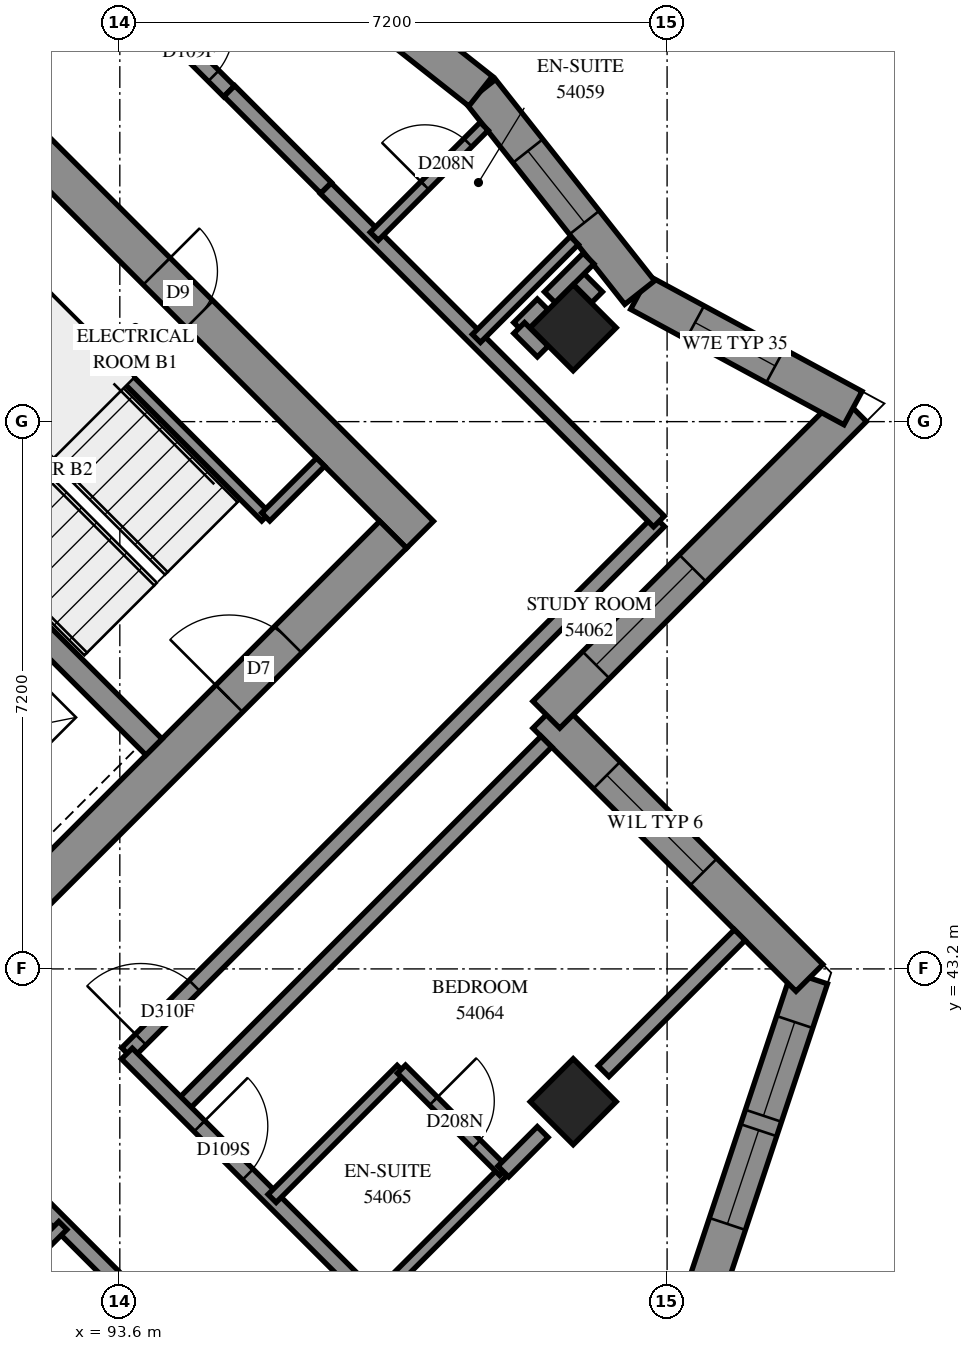
"""IFC4 building model, lengths in metres.
Left out: names, types, materials, properties, quantities, classifications, styles, units other than length and angle.
Written with IfcOpenShell. Run it as: python <this file> out.ifc"""

import sys

from ifc_helpers import new_model, si_unit, direction, frame, frame_2d, origin, origin_2d, place, context, subcontext, project, spatial, polyline, rectangle, outline, extrude, element, fill, save


model = new_model("IFC4")
c1 = context("Model", 3, precision=1e-05, world=origin(), true_north=direction((0.0, 1.0)))
c2 = subcontext(c1, "Body", "Model", "MODEL_VIEW")
j1 = project(units=[si_unit("LENGTHUNIT", "METRE"), si_unit("PLANEANGLEUNIT", "RADIAN")], contexts=[c1])
p1 = place(None, origin())
s1 = spatial("IfcSite", under=j1, at=p1, CompositionType="ELEMENT")
p2 = place(p1, origin())
s2 = spatial("IfcBuilding", under=s1, at=p2, CompositionType="ELEMENT")
p3 = place(p2, frame((0.0, 0.0, 199.8)))
s3 = spatial("IfcBuildingStorey", under=s2, at=p3, CompositionType="ELEMENT", Elevation=199.8)
for number, where, z_axis, x_axis in (
    (1, (99.565, 51.635, 0.0), (0.0, 0.0, 1.0), (0.707, -0.707, 0.0)),
    (2, (99.565, 41.453, 0.0), (0.0, 0.0, 1.0), (0.707, -0.707, 0.0)),
):
    element("IfcColumn", number, at=place(p3, frame(where, z_axis=z_axis, x_axis=x_axis)), inside=s3, PredefinedType="COLUMN", context=c2, shape_type="SweptSolid", body=[
        extrude(rectangle(XDim=0.8, YDim=0.8, at=origin_2d()), origin(), (0.0, 0.0, 1.0), 3.1),
    ])
p4 = place(p3, frame((86.66, 59.802, -0.3), z_axis=(0.0, 0.0, 1.0), x_axis=(0.7071067812, -0.7071067812, 0.0)))
e3 = element("IfcWall", 3, at=p4, inside=s3, PredefinedType="SHEAR", context=c2, shape_type="SweptSolid", body=[
    extrude(rectangle(XDim=15.4, YDim=0.5, at=frame_2d((7.7, 0.0))), origin(), (0.0, 0.0, 1.0), 2.7),
])
p5 = place(p4, frame((10.5, 0.0, 0.3)))
e4 = element("IfcOpeningElement", 4, at=p5, cuts=e3, PredefinedType="OPENING", context=c2, shape_type="SweptSolid", body=[
    extrude(rectangle(XDim=0.8, YDim=2.1, at=frame_2d((0.4, 1.05))), frame((0.0, 0.26, 0.0), z_axis=(0.0, -1.0, 0.0), x_axis=(1.0, 0.0, 0.0)), (0.0, 0.0, 1.0), 0.52),
])
p6 = place(p3, frame((87.013, 38.731, -0.3), z_axis=(0.0, 0.0, 1.0), x_axis=(0.7071067812, 0.7071067812, 0.0)))
e5 = element("IfcWall", 5, at=p6, inside=s3, PredefinedType="SHEAR", context=c2, shape_type="SweptSolid", body=[
    extrude(rectangle(XDim=14.4, YDim=0.5, at=frame_2d((7.2, 0.0))), origin(), (0.0, 0.0, 1.0), 2.7),
])
p7 = place(p6, frame((4.55, 0.0, 0.3)))
e6 = element("IfcOpeningElement", 6, at=p7, cuts=e5, PredefinedType="OPENING", context=c2, shape_type="SweptSolid", body=[
    extrude(rectangle(XDim=1.1, YDim=2.1, at=frame_2d((0.55, 1.05))), frame((0.0, 0.26, 0.0), z_axis=(0.0, -1.0, 0.0), x_axis=(1.0, 0.0, 0.0)), (0.0, 0.0, 1.0), 0.52),
])
p8 = place(p6, frame((11.35, 0.0, 0.3)))
e7 = element("IfcOpeningElement", 7, at=p8, cuts=e5, PredefinedType="OPENING", context=c2, shape_type="SweptSolid", body=[
    extrude(rectangle(XDim=1.1, YDim=2.1, at=frame_2d((0.55, 1.05))), frame((0.0, 0.26, 0.0), z_axis=(0.0, -1.0, 0.0), x_axis=(1.0, 0.0, 0.0)), (0.0, 0.0, 1.0), 0.52),
])
p9 = place(p3, frame((88.958, 51.211, 0.0), z_axis=(0.0, 0.0, 1.0), x_axis=(0.7070998367, -0.7071137256, 0.0)))
e8 = element("IfcWall", 8, at=p9, inside=s3, PredefinedType="SOLIDWALL", context=c2, shape_type="SweptSolid", body=[
    extrude(rectangle(XDim=7.2, YDim=0.3, at=frame_2d((3.6, 0.0))), origin(), (0.0, 0.0, 1.0), 3.1),
])
p10 = place(p3, frame((101.062, 38.252, 0.0), z_axis=(0.0, 0.0, 1.0), x_axis=(0.3162395484, 0.9486793705, 0.0)))
e9 = element("IfcWall", 9, at=p10, inside=s3, PredefinedType="SOLIDWALL", context=c2, shape_type="SweptSolid", body=[
    extrude(outline(polyline([(-0.12, -0.25), (5.247, -0.25), (4.938, 0.25), (0.12, 0.25), (-0.12, -0.25)])), origin(), (0.0, 0.0, 1.0), 3.1),
])
p11 = place(p10, frame((1.68, 0.0, 0.45)))
e10 = element("IfcOpeningElement", 10, at=p11, cuts=e9, PredefinedType="OPENING", context=c2, shape_type="SweptSolid", body=[
    extrude(rectangle(XDim=1.3, YDim=2.5, at=frame_2d((0.65, 1.25))), frame((0.0, 0.26, 0.0), z_axis=(0.0, -1.0, 0.0), x_axis=(1.0, 0.0, 0.0)), (0.0, 0.0, 1.0), 0.52),
])
p12 = place(p10, frame((3.18, 0.0, 0.45)))
e11 = element("IfcOpeningElement", 11, at=p12, cuts=e9, PredefinedType="OPENING", context=c2, shape_type="SweptSolid", body=[
    extrude(rectangle(XDim=1.3, YDim=2.5, at=frame_2d((0.65, 1.25))), frame((0.0, 0.26, 0.0), z_axis=(0.0, -1.0, 0.0), x_axis=(1.0, 0.0, 0.0)), (0.0, 0.0, 1.0), 0.52),
])
p13 = place(p3, frame((102.673, 43.083, 0.0), z_axis=(0.0, 0.0, 1.0), x_axis=(-0.7071067812, 0.7071067812, 0.0)))
e12 = element("IfcWall", 12, at=p13, inside=s3, PredefinedType="SOLIDWALL", context=c2, shape_type="SweptSolid", body=[
    extrude(outline(polyline([(-0.154, -0.25), (4.646, -0.25), (5.146, 0.25), (0.154, 0.25), (-0.154, -0.25)])), origin(), (0.0, 0.0, 1.0), 3.1),
])
p14 = place(p13, frame((1.97, 0.0, 0.6)))
e13 = element("IfcOpeningElement", 13, at=p14, cuts=e12, PredefinedType="OPENING", context=c2, shape_type="SweptSolid", body=[
    extrude(rectangle(XDim=1.8, YDim=1.9, at=frame_2d((0.9, 0.95))), frame((0.0, 0.26, 0.0), z_axis=(0.0, -1.0, 0.0), x_axis=(1.0, 0.0, 0.0)), (0.0, 0.0, 1.0), 0.52),
])
p15 = place(p3, frame((99.211, 46.544, 0.0), z_axis=(0.0, 0.0, 1.0), x_axis=(0.7071067812, 0.7071067812, 0.0)))
e14 = element("IfcWall", 14, at=p15, inside=s3, PredefinedType="SOLIDWALL", context=c2, shape_type="SweptSolid", body=[
    extrude(outline(polyline([(0.25, -0.25), (6.041, -0.25), (5.371, 0.25), (-0.25, 0.25), (0.25, -0.25)])), origin(), (0.0, 0.0, 1.0), 3.1),
])
p16 = place(p15, frame((0.925, 0.0, 0.6)))
e15 = element("IfcOpeningElement", 15, at=p16, cuts=e14, PredefinedType="OPENING", context=c2, shape_type="SweptSolid", body=[
    extrude(rectangle(XDim=1.8, YDim=1.9, at=frame_2d((0.9, 0.95))), frame((0.0, 0.26, 0.0), z_axis=(0.0, -1.0, 0.0), x_axis=(1.0, 0.0, 0.0)), (0.0, 0.0, 1.0), 0.52),
])
p17 = place(p3, frame((103.246, 50.579, 0.0), z_axis=(0.0, 0.0, 1.0), x_axis=(-0.8794013024, 0.4760812424, 0.0)))
e16 = element("IfcWall", 16, at=p17, inside=s3, PredefinedType="SOLIDWALL", context=c2, shape_type="SweptSolid", body=[
    extrude(outline(polyline([(-0.335, -0.25), (3.14, -0.25), (3.243, 0.25), (0.335, 0.25), (-0.335, -0.25)])), origin(), (0.0, 0.0, 1.0), 3.1),
])
p18 = place(p17, frame((1.163, 0.0, 0.45)))
e17 = element("IfcOpeningElement", 17, at=p18, cuts=e16, PredefinedType="OPENING", context=c2, shape_type="SweptSolid", body=[
    extrude(rectangle(XDim=1.2, YDim=2.5, at=frame_2d((0.6, 1.25))), frame((0.0, 0.26, 0.0), z_axis=(0.0, -1.0, 0.0), x_axis=(1.0, 0.0, 0.0)), (0.0, 0.0, 1.0), 0.52),
])
p19 = place(p3, frame((100.439, 52.098, 0.0), z_axis=(0.0, 0.0, 1.0), x_axis=(-0.6198277208, 0.7847379158, 0.0)))
e18 = element("IfcWall", 18, at=p19, inside=s3, PredefinedType="SOLIDWALL", context=c2, shape_type="SweptSolid", body=[
    extrude(outline(polyline([(0.051, -0.25), (3.405, -0.25), (3.346, 0.25), (-0.051, 0.25), (0.051, -0.25)])), origin(), (0.0, 0.0, 1.0), 3.1),
])
p20 = place(p19, frame((1.173, 0.0, 0.45)))
e19 = element("IfcOpeningElement", 19, at=p20, cuts=e18, PredefinedType="OPENING", context=c2, shape_type="SweptSolid", body=[
    extrude(rectangle(XDim=1.2, YDim=2.5, at=frame_2d((0.6, 1.25))), frame((0.0, 0.26, 0.0), z_axis=(0.0, -1.0, 0.0), x_axis=(1.0, 0.0, 0.0)), (0.0, 0.0, 1.0), 0.52),
])
p21 = place(p3, frame((98.347, 54.747, 0.0), z_axis=(0.0, 0.0, 1.0), x_axis=(-0.7847316147, 0.6198356984, 0.0)))
e20 = element("IfcWall", 20, at=p21, inside=s3, PredefinedType="SOLIDWALL", context=c2, shape_type="SweptSolid", body=[
    extrude(outline(polyline([(-0.029, -0.25), (3.324, -0.25), (3.383, 0.25), (0.029, 0.25), (-0.029, -0.25)])), origin(), (0.0, 0.0, 1.0), 3.1),
])
p22 = place(p21, frame((1.248, 0.0, 0.45)))
e21 = element("IfcOpeningElement", 21, at=p22, cuts=e20, PredefinedType="OPENING", context=c2, shape_type="SweptSolid", body=[
    extrude(rectangle(XDim=1.2, YDim=2.5, at=frame_2d((0.6, 1.25))), frame((0.0, 0.26, 0.0), z_axis=(0.0, -1.0, 0.0), x_axis=(1.0, 0.0, 0.0)), (0.0, 0.0, 1.0), 0.52),
])
p23 = place(p3, frame((91.313, 53.354, 0.0), z_axis=(0.0, 0.0, 1.0), x_axis=(0.7071067812, -0.7071067812, 0.0)))
e22 = element("IfcWall", 22, at=p23, inside=s3, PredefinedType="PARTITIONING", context=c2, shape_type="SweptSolid", body=[
    extrude(rectangle(XDim=5.95, YDim=0.15, at=frame_2d((2.975, 0.0))), origin(), (0.0, 0.0, 1.0), 3.1),
])
p24 = place(p3, frame((95.52, 49.146, 0.0), z_axis=(0.0, 0.0, 1.0), x_axis=(0.7071067812, 0.7071067812, 0.0)))
e23 = element("IfcWall", 23, at=p24, inside=s3, PredefinedType="PARTITIONING", context=c2, shape_type="SweptSolid", body=[
    extrude(rectangle(XDim=1.02, YDim=0.15, at=frame_2d((0.51, 0.0))), origin(), (0.0, 0.0, 1.0), 3.1),
])
p25 = place(p3, frame((93.695, 42.091, 0.0), z_axis=(0.0, 0.0, 1.0), x_axis=(0.7071067812, 0.7071067812, 0.0)))
e24 = element("IfcWall", 24, at=p25, inside=s3, PredefinedType="PARTITIONING", context=c2, shape_type="SweptSolid", body=[
    extrude(rectangle(XDim=9.899, YDim=0.2, at=frame_2d((4.95, 0.0))), origin(), (0.0, 0.0, 1.0), 3.1),
])
p26 = place(p25, frame((0.255, 0.0, 0.0)))
e25 = element("IfcOpeningElement", 25, at=p26, cuts=e24, PredefinedType="OPENING", context=c2, shape_type="SweptSolid", body=[
    extrude(rectangle(XDim=1.0, YDim=2.1, at=frame_2d((0.5, 1.05))), frame((0.0, 0.11, 0.0), z_axis=(0.0, -1.0, 0.0), x_axis=(1.0, 0.0, 0.0)), (0.0, 0.0, 1.0), 0.22),
])
p27 = place(p3, frame((94.402, 41.382, 0.0), z_axis=(0.0, 0.0, 1.0), x_axis=(0.7072538072, 0.7069597246, 0.0)))
e26 = element("IfcWall", 26, at=p27, inside=s3, PredefinedType="PARTITIONING", context=c2, shape_type="SweptSolid", body=[
    extrude(rectangle(XDim=6.801, YDim=0.2, at=frame_2d((3.4, 0.0))), origin(), (0.0, 0.0, 1.0), 3.1),
])
p28 = place(p3, frame((96.309, 53.471, 0.0), z_axis=(0.0, 0.0, 1.0), x_axis=(0.7071067812, -0.7071067812, 0.0)))
e27 = element("IfcWall", 27, at=p28, inside=s3, PredefinedType="PARTITIONING", context=c2, shape_type="SweptSolid", body=[
    extrude(rectangle(XDim=6.2, YDim=0.2, at=frame_2d((3.1, 0.0))), origin(), (0.0, 0.0, 1.0), 3.1),
])
p29 = place(p3, frame((93.693, 42.085, 0.0), z_axis=(0.0, 0.0, 1.0), x_axis=(0.7071067812, -0.7071067812, 0.0)))
e28 = element("IfcWall", 28, at=p29, inside=s3, PredefinedType="PARTITIONING", context=c2, shape_type="SweptSolid", body=[
    extrude(rectangle(XDim=4.599, YDim=0.2, at=frame_2d((2.3, 0.0))), origin(), (0.0, 0.0, 1.0), 3.1),
])
p30 = place(p29, frame((1.349, 0.0, 0.0)))
e29 = element("IfcOpeningElement", 29, at=p30, cuts=e28, PredefinedType="OPENING", context=c2, shape_type="SweptSolid", body=[
    extrude(rectangle(XDim=0.9, YDim=2.1, at=frame_2d((0.45, 1.05))), frame((0.0, 0.11, 0.0), z_axis=(0.0, -1.0, 0.0), x_axis=(1.0, 0.0, 0.0)), (0.0, 0.0, 1.0), 0.22),
])
p31 = place(p3, frame((92.137, 40.531, 0.0), z_axis=(0.0, 0.0, 1.0), x_axis=(0.7071067812, -0.7071067812, 0.0)))
e30 = element("IfcWall", 30, at=p31, inside=s3, PredefinedType="PARTITIONING", context=c2, shape_type="SweptSolid", body=[
    extrude(rectangle(XDim=4.599, YDim=0.2, at=frame_2d((2.3, 0.0))), origin(), (0.0, 0.0, 1.0), 3.1),
])
p32 = place(p31, frame((3.083, 0.0, 0.0)))
e31 = element("IfcOpeningElement", 31, at=p32, cuts=e30, PredefinedType="OPENING", context=c2, shape_type="SweptSolid", body=[
    extrude(rectangle(XDim=0.9, YDim=2.1, at=frame_2d((0.45, 1.05))), frame((0.0, 0.11, 0.0), z_axis=(0.0, -1.0, 0.0), x_axis=(1.0, 0.0, 0.0)), (0.0, 0.0, 1.0), 0.22),
])
p33 = place(p3, frame((99.964, 41.854, 0.0), z_axis=(0.0, 0.0, 1.0), x_axis=(0.7071265121, 0.7070870497, 0.0)))
e32 = element("IfcWall", 32, at=p33, inside=s3, PredefinedType="PARTITIONING", context=c2, shape_type="SweptSolid", body=[
    extrude(rectangle(XDim=2.534, YDim=0.2, at=frame_2d((1.267, 0.0))), origin(), (0.0, 0.0, 1.0), 3.1),
])
p34 = place(p3, frame((95.603, 40.181, 0.0), z_axis=(0.0, 0.0, 1.0), x_axis=(0.7071067812, 0.7071067812, 0.0)))
e33 = element("IfcWall", 33, at=p34, inside=s3, PredefinedType="PARTITIONING", context=c2, shape_type="SweptSolid", body=[
    extrude(rectangle(XDim=2.401, YDim=0.15, at=frame_2d((1.201, 0.0))), origin(), (0.0, 0.0, 1.0), 3.1),
])
p35 = place(p3, frame((96.947, 38.837, 0.0), z_axis=(0.0, 0.0, 1.0), x_axis=(0.7071067812, 0.7071067812, 0.0)))
e34 = element("IfcWall", 34, at=p35, inside=s3, PredefinedType="PARTITIONING", context=c2, shape_type="SweptSolid", body=[
    extrude(rectangle(XDim=2.401, YDim=0.15, at=frame_2d((1.201, 0.0))), origin(), (0.0, 0.0, 1.0), 2.6),
])
p36 = place(p3, frame((91.152, 38.128, 0.0), z_axis=(0.0, 0.0, 1.0), x_axis=(0.7075233388, 0.706689978, 0.0)))
e35 = element("IfcWall", 35, at=p36, inside=s3, PredefinedType="PARTITIONING", context=c2, shape_type="SweptSolid", body=[
    extrude(rectangle(XDim=2.4, YDim=0.15, at=frame_2d((1.2, 0.0))), origin(), (0.0, 0.0, 1.0), 3.1),
])
p37 = place(p3, frame((96.948, 52.838, 0.0), z_axis=(0.0, 0.0, 1.0), x_axis=(0.7070823329, 0.7071312287, 0.0)))
e36 = element("IfcWall", 36, at=p37, inside=s3, PredefinedType="PARTITIONING", context=c2, shape_type="SweptSolid", body=[
    extrude(rectangle(XDim=2.045, YDim=0.15, at=frame_2d((1.023, 0.0))), origin(), (0.0, 0.0, 1.0), 3.1),
])
p38 = place(p37, frame((0.943, 0.0, 0.0)))
e37 = element("IfcOpeningElement", 37, at=p38, cuts=e36, PredefinedType="OPENING", context=c2, shape_type="SweptSolid", body=[
    extrude(rectangle(XDim=0.8, YDim=2.1, at=frame_2d((0.4, 1.05))), frame((0.0, 0.085, 0.0), z_axis=(0.0, -1.0, 0.0), x_axis=(1.0, 0.0, 0.0)), (0.0, 0.0, 1.0), 0.17),
])
p39 = place(p3, frame((97.305, 41.881, 0.0), z_axis=(0.0, 0.0, 1.0), x_axis=(0.7071067812, -0.7071067812, 0.0)))
e38 = element("IfcWall", 38, at=p39, inside=s3, PredefinedType="PARTITIONING", context=c2, shape_type="SweptSolid", body=[
    extrude(rectangle(XDim=1.901, YDim=0.15, at=frame_2d((0.95, 0.0))), origin(), (0.0, 0.0, 1.0), 3.1),
])
p40 = place(p39, frame((0.596, 0.0, 0.0)))
e39 = element("IfcOpeningElement", 39, at=p40, cuts=e38, PredefinedType="OPENING", context=c2, shape_type="SweptSolid", body=[
    extrude(rectangle(XDim=0.8, YDim=2.1, at=frame_2d((0.4, 1.05))), frame((0.0, 0.085, 0.0), z_axis=(0.0, -1.0, 0.0), x_axis=(1.0, 0.0, 0.0)), (0.0, 0.0, 1.0), 0.17),
])
p41 = place(p3, frame((93.763, 56.017, 0.0), z_axis=(0.0, 0.0, 1.0), x_axis=(0.7076620277, -0.7065510983, 0.0)))
e40 = element("IfcWall", 40, at=p41, inside=s3, PredefinedType="PARTITIONING", context=c2, shape_type="SweptSolid", body=[
    extrude(rectangle(XDim=1.8, YDim=0.2, at=frame_2d((0.9, 0.0))), origin(), (0.0, 0.0, 1.0), 3.1),
])
p42 = place(p41, frame((0.612, 0.0, 0.0)))
e41 = element("IfcOpeningElement", 41, at=p42, cuts=e40, PredefinedType="OPENING", context=c2, shape_type="SweptSolid", body=[
    extrude(rectangle(XDim=0.9, YDim=2.1, at=frame_2d((0.45, 1.05))), frame((0.0, 0.11, 0.0), z_axis=(0.0, -1.0, 0.0), x_axis=(1.0, 0.0, 0.0)), (0.0, 0.0, 1.0), 0.22),
])
p43 = place(p3, frame((95.041, 54.749, 0.0), z_axis=(0.0, 0.0, 1.0), x_axis=(0.7065510983, -0.7076620277, 0.0)))
e42 = element("IfcWall", 42, at=p43, inside=s3, PredefinedType="PARTITIONING", context=c2, shape_type="SweptSolid", body=[
    extrude(rectangle(XDim=1.8, YDim=0.2, at=frame_2d((0.9, 0.0))), origin(), (0.0, 0.0, 1.0), 3.1),
])
p44 = place(p3, frame((98.291, 51.495, 0.0), z_axis=(0.0, 0.0, 1.0), x_axis=(0.7070793404, 0.7071342209, 0.0)))
e43 = element("IfcWall", 43, at=p44, inside=s3, PredefinedType="PARTITIONING", context=c2, shape_type="SweptSolid", body=[
    extrude(rectangle(XDim=1.822, YDim=0.15, at=frame_2d((0.911, 0.0))), origin(), (0.0, 0.0, 1.0), 3.1),
])
p45 = place(p3, frame((98.645, 40.535, 0.0), z_axis=(0.0, 0.0, 1.0), x_axis=(0.7057430303, 0.7084679069, 0.0)))
e44 = element("IfcWall", 44, at=p45, inside=s3, PredefinedType="PARTITIONING", context=c2, shape_type="SweptSolid", body=[
    extrude(rectangle(XDim=0.734, YDim=0.2, at=frame_2d((0.367, 0.0))), origin(), (0.0, 0.0, 1.0), 2.6),
])
for number, where, z_axis, x_axis in (
    (45, (98.853, 51.633, 0.0), (0.0, 0.0, 1.0), (0.707, 0.707, 0.0)),
    (46, (98.854, 51.632, 0.0), (0.0, 0.0, 1.0), (0.707, -0.707, 0.0)),
    (47, (99.568, 52.346, 0.0), (0.0, 0.0, 1.0), (0.707, -0.707, 0.0)),
):
    element("IfcWall", number, at=place(p3, frame(where, z_axis=z_axis, x_axis=x_axis)), inside=s3, PredefinedType="PARTITIONING", context=c2, shape_type="SweptSolid", body=[
        extrude(rectangle(XDim=0.438, YDim=0.2, at=frame_2d((0.219, 0.0))), origin(), (0.0, 0.0, 1.0), 3.1),
    ])
p46 = place(p3, frame((99.257, 52.037, 0.0), z_axis=(0.0, 0.0, 1.0), x_axis=(0.7071067812, 0.7071067812, 0.0)))
e48 = element("IfcWall", 48, at=p46, inside=s3, PredefinedType="PARTITIONING", context=c2, shape_type="SweptSolid", body=[
    extrude(rectangle(XDim=0.721, YDim=0.2, at=frame_2d((0.36, 0.0))), origin(), (0.0, 0.0, 1.0), 3.1),
])
p47 = place(p11, origin())
e49 = element("IfcWindow", 49, at=p47, inside=s3, PartitioningType="SINGLE_PANEL", PredefinedType="WINDOW", context=c2, shape_type="SweptSolid", body=[
    extrude(rectangle(XDim=1.3, YDim=2.5, at=frame_2d((0.65, 1.25))), frame((0.0, 0.18, 0.0), z_axis=(0.0, -1.0, 0.0), x_axis=(1.0, 0.0, 0.0)), (0.0, 0.0, 1.0), 0.06),
])
fill(e10, e49)
p48 = place(p12, origin())
e50 = element("IfcWindow", 50, at=p48, inside=s3, PartitioningType="SINGLE_PANEL", PredefinedType="WINDOW", context=c2, shape_type="SweptSolid", body=[
    extrude(rectangle(XDim=1.3, YDim=2.5, at=frame_2d((0.65, 1.25))), frame((0.0, 0.18, 0.0), z_axis=(0.0, -1.0, 0.0), x_axis=(1.0, 0.0, 0.0)), (0.0, 0.0, 1.0), 0.06),
])
fill(e11, e50)
p49 = place(p14, origin())
e51 = element("IfcWindow", 51, at=p49, inside=s3, PartitioningType="SINGLE_PANEL", PredefinedType="WINDOW", context=c2, shape_type="SweptSolid", body=[
    extrude(rectangle(XDim=1.8, YDim=1.9, at=frame_2d((0.9, 0.95))), frame((0.0, 0.18, 0.0), z_axis=(0.0, -1.0, 0.0), x_axis=(1.0, 0.0, 0.0)), (0.0, 0.0, 1.0), 0.06),
])
fill(e13, e51)
p50 = place(p16, origin())
e52 = element("IfcWindow", 52, at=p50, inside=s3, PartitioningType="SINGLE_PANEL", PredefinedType="WINDOW", context=c2, shape_type="SweptSolid", body=[
    extrude(rectangle(XDim=1.8, YDim=1.9, at=frame_2d((0.9, 0.95))), frame((0.0, 0.18, 0.0), z_axis=(0.0, -1.0, 0.0), x_axis=(1.0, 0.0, 0.0)), (0.0, 0.0, 1.0), 0.06),
])
fill(e15, e52)
p51 = place(p18, origin())
e53 = element("IfcWindow", 53, at=p51, inside=s3, PartitioningType="SINGLE_PANEL", PredefinedType="WINDOW", context=c2, shape_type="SweptSolid", body=[
    extrude(rectangle(XDim=1.2, YDim=2.5, at=frame_2d((0.6, 1.25))), frame((0.0, 0.18, 0.0), z_axis=(0.0, -1.0, 0.0), x_axis=(1.0, 0.0, 0.0)), (0.0, 0.0, 1.0), 0.06),
])
fill(e17, e53)
p52 = place(p20, origin())
e54 = element("IfcWindow", 54, at=p52, inside=s3, PartitioningType="SINGLE_PANEL", PredefinedType="WINDOW", context=c2, shape_type="SweptSolid", body=[
    extrude(rectangle(XDim=1.2, YDim=2.5, at=frame_2d((0.6, 1.25))), frame((0.0, 0.18, 0.0), z_axis=(0.0, -1.0, 0.0), x_axis=(1.0, 0.0, 0.0)), (0.0, 0.0, 1.0), 0.06),
])
fill(e19, e54)
p53 = place(p5, origin())
e55 = element("IfcDoor", 55, at=p53, inside=s3, OperationType="SINGLE_SWING_RIGHT", PredefinedType="DOOR", context=c2, shape_type="SweptSolid", body=[
    extrude(rectangle(XDim=0.8, YDim=2.1, at=frame_2d((0.4, 1.05))), frame((0.0, 0.025, 0.0), z_axis=(0.0, -1.0, 0.0), x_axis=(1.0, 0.0, 0.0)), (0.0, 0.0, 1.0), 0.05),
])
fill(e4, e55)
p54 = place(p8, origin())
e56 = element("IfcDoor", 56, at=p54, inside=s3, OperationType="SINGLE_SWING_RIGHT", PredefinedType="DOOR", context=c2, shape_type="SweptSolid", body=[
    extrude(rectangle(XDim=1.1, YDim=2.1, at=frame_2d((0.55, 1.05))), frame((0.0, 0.025, 0.0), z_axis=(0.0, -1.0, 0.0), x_axis=(1.0, 0.0, 0.0)), (0.0, 0.0, 1.0), 0.05),
])
fill(e7, e56)
p55 = place(p42, origin())
e57 = element("IfcDoor", 57, at=p55, inside=s3, OperationType="SINGLE_SWING_LEFT", PredefinedType="DOOR", context=c2, shape_type="SweptSolid", body=[
    extrude(rectangle(XDim=0.9, YDim=2.1, at=frame_2d((0.45, 1.05))), frame((0.0, 0.025, 0.0), z_axis=(0.0, -1.0, 0.0), x_axis=(1.0, 0.0, 0.0)), (0.0, 0.0, 1.0), 0.05),
])
fill(e41, e57)
p56 = place(p38, origin())
e58 = element("IfcDoor", 58, at=p56, inside=s3, OperationType="SINGLE_SWING_RIGHT", PredefinedType="DOOR", context=c2, shape_type="SweptSolid", body=[
    extrude(rectangle(XDim=0.8, YDim=2.1, at=frame_2d((0.4, 1.05))), frame((0.0, 0.025, 0.0), z_axis=(0.0, -1.0, 0.0), x_axis=(1.0, 0.0, 0.0)), (0.0, 0.0, 1.0), 0.05),
])
fill(e37, e58)
p57 = place(p26, origin())
e59 = element("IfcDoor", 59, at=p57, inside=s3, OperationType="SINGLE_SWING_LEFT", PredefinedType="DOOR", context=c2, shape_type="SweptSolid", body=[
    extrude(rectangle(XDim=1.0, YDim=2.1, at=frame_2d((0.5, 1.05))), frame((0.0, 0.025, 0.0), z_axis=(0.0, -1.0, 0.0), x_axis=(1.0, 0.0, 0.0)), (0.0, 0.0, 1.0), 0.05),
])
fill(e25, e59)
p58 = place(p30, origin())
e60 = element("IfcDoor", 60, at=p58, inside=s3, OperationType="SINGLE_SWING_RIGHT", PredefinedType="DOOR", context=c2, shape_type="SweptSolid", body=[
    extrude(rectangle(XDim=0.9, YDim=2.1, at=frame_2d((0.45, 1.05))), frame((0.0, 0.025, 0.0), z_axis=(0.0, -1.0, 0.0), x_axis=(1.0, 0.0, 0.0)), (0.0, 0.0, 1.0), 0.05),
])
fill(e29, e60)
p59 = place(p40, origin())
e61 = element("IfcDoor", 61, at=p59, inside=s3, OperationType="SINGLE_SWING_RIGHT", PredefinedType="DOOR", context=c2, shape_type="SweptSolid", body=[
    extrude(rectangle(XDim=0.8, YDim=2.1, at=frame_2d((0.4, 1.05))), frame((0.0, 0.025, 0.0), z_axis=(0.0, -1.0, 0.0), x_axis=(1.0, 0.0, 0.0)), (0.0, 0.0, 1.0), 0.05),
])
fill(e39, e61)
save(model, sys.argv[1])
